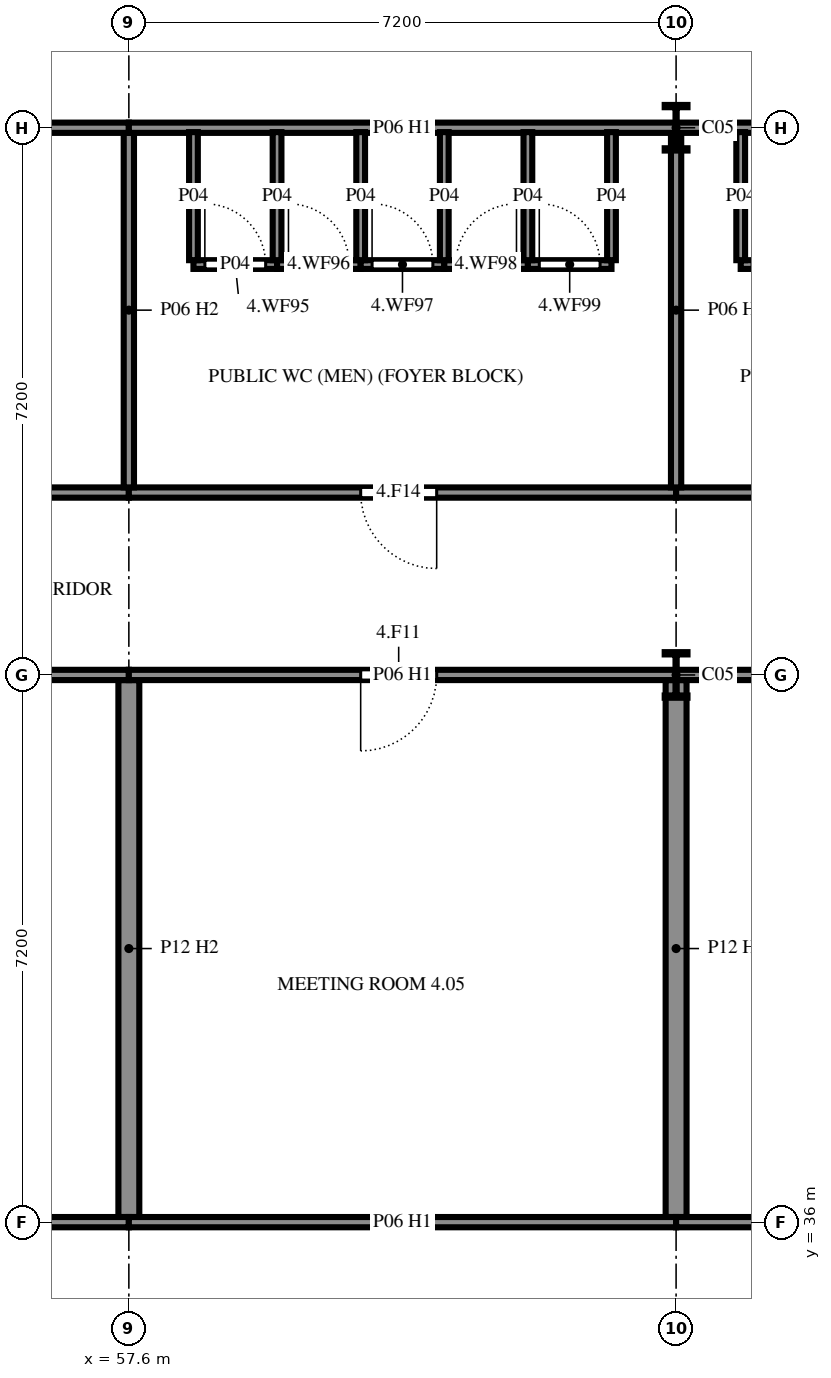
"""IFC4 building model, lengths in metres.
Left out: names, types, materials, properties, quantities, classifications, styles, units other than length and angle.
Written with IfcOpenShell. Run it as: python <this file> out.ifc"""

import sys

from ifc_helpers import new_model, si_unit, direction, frame, frame_2d, origin, origin_2d, place, context, subcontext, project, spatial, rectangle, i_section, extrude, element, fill, save


model = new_model("IFC4")
c1 = context("Model", 3, precision=1e-05, world=origin(), true_north=direction((0.0, 1.0)))
c2 = subcontext(c1, "Body", "Model", "MODEL_VIEW")
j1 = project(units=[si_unit("LENGTHUNIT", "METRE"), si_unit("PLANEANGLEUNIT", "RADIAN")], contexts=[c1])
p1 = place(None, origin())
s1 = spatial("IfcSite", under=j1, at=p1, CompositionType="ELEMENT")
p2 = place(p1, origin())
s2 = spatial("IfcBuilding", under=s1, at=p2, CompositionType="ELEMENT")
p3 = place(p2, frame((0.0, 0.0, 14.4)))
s3 = spatial("IfcBuildingStorey", under=s2, at=p3, CompositionType="ELEMENT", Elevation=14.4)
for number, where, z_axis, x_axis in (
    (1, (64.8, 43.2, 0.0), (0.0, 0.0, 1.0), (1.0, 0.0, 0.0)),
    (2, (64.8, 50.4, 0.0), (0.0, 0.0, 1.0), (1.0, 0.0, 0.0)),
):
    element("IfcColumn", number, at=place(p3, frame(where, z_axis=z_axis, x_axis=x_axis)), inside=s3, PredefinedType="COLUMN", context=c2, shape_type="SweptSolid", body=[
        extrude(i_section(OverallWidth=0.3, OverallDepth=0.6, WebThickness=0.015, FlangeThickness=0.03, FilletRadius=0.027, at=origin_2d()), origin(), (0.0, 0.0, 1.0), 3.6),
    ])
p4 = place(p3, frame((57.6, 43.133, 0.0), z_axis=(0.0, 0.0, 1.0), x_axis=(0.0, -1.0, 0.0)))
e3 = element("IfcWall", 3, at=p4, inside=s3, PredefinedType="PARTITIONING", context=c2, shape_type="SweptSolid", body=[
    extrude(rectangle(XDim=7.065, YDim=0.275, at=frame_2d((3.533, 0.0))), origin(), (0.0, 0.0, 1.0), 3.12),
])
p5 = place(p3, frame((50.333, 43.2, 0.0), z_axis=(0.0, 0.0, 1.0), x_axis=(1.0, 0.0, 0.0)))
e4 = element("IfcWall", 4, at=p5, inside=s3, PredefinedType="PARTITIONING", context=c2, shape_type="SweptSolid", body=[
    extrude(rectangle(XDim=7.268, YDim=0.135, at=frame_2d((3.634, 0.0))), origin(), (0.0, 0.0, 1.0), 2.82),
])
p6 = place(p5, frame((3.15, 0.0, 0.0)))
e5 = element("IfcOpeningElement", 5, at=p6, cuts=e4, PredefinedType="OPENING", context=c2, shape_type="SweptSolid", body=[
    extrude(rectangle(XDim=1.0, YDim=2.4, at=frame_2d((0.5, 1.2))), frame((0.0, 0.077, 0.0), z_axis=(0.0, -1.0, 0.0), x_axis=(1.0, 0.0, 0.0)), (0.0, 0.0, 1.0), 0.155),
])
p7 = place(p3, frame((57.6, 36.0, 0.0), z_axis=(0.0, 0.0, 1.0), x_axis=(-1.0, 0.0, 0.0)))
e6 = element("IfcWall", 6, at=p7, inside=s3, PredefinedType="PARTITIONING", context=c2, shape_type="SweptSolid", body=[
    extrude(rectangle(XDim=7.268, YDim=0.135, at=frame_2d((3.634, 0.0))), origin(), (0.0, 0.0, 1.0), 2.82),
])
p8 = place(p3, frame((64.8, 43.133, 0.0), z_axis=(0.0, 0.0, 1.0), x_axis=(0.0, -1.0, 0.0)))
e7 = element("IfcWall", 7, at=p8, inside=s3, PredefinedType="PARTITIONING", context=c2, shape_type="SweptSolid", body=[
    extrude(rectangle(XDim=7.065, YDim=0.275, at=frame_2d((3.533, 0.0))), origin(), (0.0, 0.0, 1.0), 2.82),
])
p9 = place(p3, frame((57.6, 43.2, 0.0), z_axis=(0.0, 0.0, 1.0), x_axis=(1.0, 0.0, 0.0)))
e8 = element("IfcWall", 8, at=p9, inside=s3, PredefinedType="PARTITIONING", context=c2, shape_type="SweptSolid", body=[
    extrude(rectangle(XDim=7.2, YDim=0.135, at=frame_2d((3.6, 0.0))), origin(), (0.0, 0.0, 1.0), 2.82),
])
p10 = place(p9, frame((3.05, 0.0, 0.0)))
e9 = element("IfcOpeningElement", 9, at=p10, cuts=e8, PredefinedType="OPENING", context=c2, shape_type="SweptSolid", body=[
    extrude(rectangle(XDim=1.0, YDim=2.4, at=frame_2d((0.5, 1.2))), frame((0.0, 0.077, 0.0), z_axis=(0.0, -1.0, 0.0), x_axis=(1.0, 0.0, 0.0)), (0.0, 0.0, 1.0), 0.155),
])
p11 = place(p3, frame((64.8, 36.0, 0.0), z_axis=(0.0, 0.0, 1.0), x_axis=(-1.0, 0.0, 0.0)))
e10 = element("IfcWall", 10, at=p11, inside=s3, PredefinedType="PARTITIONING", context=c2, shape_type="SweptSolid", body=[
    extrude(rectangle(XDim=7.2, YDim=0.135, at=frame_2d((3.6, 0.0))), origin(), (0.0, 0.0, 1.0), 2.82),
])
p12 = place(p3, frame((64.8, 43.2, 0.0), z_axis=(0.0, 0.0, 1.0), x_axis=(1.0, 0.0, 0.0)))
e11 = element("IfcWall", 11, at=p12, inside=s3, PredefinedType="PARTITIONING", context=c2, shape_type="SweptSolid", body=[
    extrude(rectangle(XDim=7.267, YDim=0.135, at=frame_2d((3.634, 0.0))), origin(), (0.0, 0.0, 1.0), 2.82),
])
p13 = place(p12, frame((3.15, 0.0, 0.0)))
e12 = element("IfcOpeningElement", 12, at=p13, cuts=e11, PredefinedType="OPENING", context=c2, shape_type="SweptSolid", body=[
    extrude(rectangle(XDim=1.0, YDim=2.4, at=frame_2d((0.5, 1.2))), frame((0.0, 0.077, 0.0), z_axis=(0.0, -1.0, 0.0), x_axis=(1.0, 0.0, 0.0)), (0.0, 0.0, 1.0), 0.155),
])
p14 = place(p3, frame((72.067, 36.0, 0.0), z_axis=(0.0, 0.0, 1.0), x_axis=(-1.0, 0.0, 0.0)))
e13 = element("IfcWall", 13, at=p14, inside=s3, PredefinedType="PARTITIONING", context=c2, shape_type="SweptSolid", body=[
    extrude(rectangle(XDim=7.267, YDim=0.135, at=frame_2d((3.634, 0.0))), origin(), (0.0, 0.0, 1.0), 2.82),
])
p15 = place(p3, frame((50.333, 45.6, 0.0), z_axis=(0.0, 0.0, 1.0), x_axis=(1.0, 0.0, 0.0)))
e14 = element("IfcWall", 14, at=p15, inside=s3, PredefinedType="PARTITIONING", context=c2, shape_type="SweptSolid", body=[
    extrude(rectangle(XDim=7.268, YDim=0.135, at=frame_2d((3.634, 0.0))), origin(), (0.0, 0.0, 1.0), 3.42),
])
p16 = place(p15, frame((3.15, 0.0, 0.0)))
e15 = element("IfcOpeningElement", 15, at=p16, cuts=e14, PredefinedType="OPENING", context=c2, shape_type="SweptSolid", body=[
    extrude(rectangle(XDim=1.0, YDim=2.4, at=frame_2d((0.5, 1.2))), frame((0.0, 0.077, 0.0), z_axis=(0.0, -1.0, 0.0), x_axis=(1.0, 0.0, 0.0)), (0.0, 0.0, 1.0), 0.155),
])
p17 = place(p3, frame((57.6, 45.6, 0.0), z_axis=(0.0, 0.0, 1.0), x_axis=(1.0, 0.0, 0.0)))
e16 = element("IfcWall", 16, at=p17, inside=s3, PredefinedType="PARTITIONING", context=c2, shape_type="SweptSolid", body=[
    extrude(rectangle(XDim=7.2, YDim=0.135, at=frame_2d((3.6, 0.0))), origin(), (0.0, 0.0, 1.0), 3.42),
])
p18 = place(p17, frame((3.05, 0.0, 0.0)))
e17 = element("IfcOpeningElement", 17, at=p18, cuts=e16, PredefinedType="OPENING", context=c2, shape_type="SweptSolid", body=[
    extrude(rectangle(XDim=1.0, YDim=2.4, at=frame_2d((0.5, 1.2))), frame((0.0, 0.077, 0.0), z_axis=(0.0, -1.0, 0.0), x_axis=(1.0, 0.0, 0.0)), (0.0, 0.0, 1.0), 0.155),
])
p19 = place(p3, frame((64.8, 45.6, 0.0), z_axis=(0.0, 0.0, 1.0), x_axis=(1.0, 0.0, 0.0)))
e18 = element("IfcWall", 18, at=p19, inside=s3, PredefinedType="PARTITIONING", context=c2, shape_type="SweptSolid", body=[
    extrude(rectangle(XDim=7.267, YDim=0.135, at=frame_2d((3.634, 0.0))), origin(), (0.0, 0.0, 1.0), 3.42),
])
p20 = place(p19, frame((3.15, 0.0, 0.0)))
e19 = element("IfcOpeningElement", 19, at=p20, cuts=e18, PredefinedType="OPENING", context=c2, shape_type="SweptSolid", body=[
    extrude(rectangle(XDim=1.0, YDim=2.4, at=frame_2d((0.5, 1.2))), frame((0.0, 0.077, 0.0), z_axis=(0.0, -1.0, 0.0), x_axis=(1.0, 0.0, 0.0)), (0.0, 0.0, 1.0), 0.155),
])
p21 = place(p3, frame((57.6, 50.333, 0.0), z_axis=(0.0, 0.0, 1.0), x_axis=(0.0, -1.0, 0.0)))
e20 = element("IfcWall", 20, at=p21, inside=s3, PredefinedType="PARTITIONING", context=c2, shape_type="SweptSolid", body=[
    extrude(rectangle(XDim=4.665, YDim=0.135, at=frame_2d((2.333, 0.0))), origin(), (0.0, 0.0, 1.0), 3.12),
])
p22 = place(p3, frame((50.333, 50.4, 0.0), z_axis=(0.0, 0.0, 1.0), x_axis=(1.0, 0.0, 0.0)))
e21 = element("IfcWall", 21, at=p22, inside=s3, PredefinedType="PARTITIONING", context=c2, shape_type="SweptSolid", body=[
    extrude(rectangle(XDim=7.268, YDim=0.135, at=frame_2d((3.634, 0.0))), origin(), (0.0, 0.0, 1.0), 2.82),
])
p23 = place(p3, frame((64.8, 50.333, 0.0), z_axis=(0.0, 0.0, 1.0), x_axis=(0.0, -1.0, 0.0)))
e22 = element("IfcWall", 22, at=p23, inside=s3, PredefinedType="PARTITIONING", context=c2, shape_type="SweptSolid", body=[
    extrude(rectangle(XDim=4.665, YDim=0.135, at=frame_2d((2.333, 0.0))), origin(), (0.0, 0.0, 1.0), 3.12),
])
p24 = place(p3, frame((57.6, 50.4, 0.0), z_axis=(0.0, 0.0, 1.0), x_axis=(1.0, 0.0, 0.0)))
e23 = element("IfcWall", 23, at=p24, inside=s3, PredefinedType="PARTITIONING", context=c2, shape_type="SweptSolid", body=[
    extrude(rectangle(XDim=7.2, YDim=0.135, at=frame_2d((3.6, 0.0))), origin(), (0.0, 0.0, 1.0), 2.82),
])
p25 = place(p3, frame((64.8, 50.4, 0.0), z_axis=(0.0, 0.0, 1.0), x_axis=(1.0, 0.0, 0.0)))
e24 = element("IfcWall", 24, at=p25, inside=s3, PredefinedType="PARTITIONING", context=c2, shape_type="SweptSolid", body=[
    extrude(rectangle(XDim=3.415, YDim=0.135, at=frame_2d((1.708, 0.0))), origin(), (0.0, 0.0, 1.0), 3.219),
])
p26 = place(p3, frame((58.45, 48.6, 0.0), z_axis=(0.0, 0.0, 1.0), x_axis=(1.0, 0.0, 0.0)))
e25 = element("IfcWall", 25, at=p26, inside=s3, PredefinedType="PARTITIONING", context=c2, shape_type="SweptSolid", body=[
    extrude(rectangle(XDim=1.1, YDim=0.115, at=frame_2d((0.55, 0.0))), origin(), (0.0, 0.0, 1.0), 3.42),
])
p27 = place(p26, frame((0.15, 0.0, 0.0)))
e26 = element("IfcOpeningElement", 26, at=p27, cuts=e25, PredefinedType="OPENING", context=c2, shape_type="SweptSolid", body=[
    extrude(rectangle(XDim=0.8, YDim=2.1, at=frame_2d((0.4, 1.05))), frame((0.0, 0.067, 0.0), z_axis=(0.0, -1.0, 0.0), x_axis=(1.0, 0.0, 0.0)), (0.0, 0.0, 1.0), 0.135),
])
p28 = place(p3, frame((58.45, 50.343, 0.0), z_axis=(0.0, 0.0, 1.0), x_axis=(0.0, -1.0, 0.0)))
e27 = element("IfcWall", 27, at=p28, inside=s3, PredefinedType="PARTITIONING", context=c2, shape_type="SweptSolid", body=[
    extrude(rectangle(XDim=1.685, YDim=0.115, at=frame_2d((0.843, 0.0))), origin(), (0.0, 0.0, 1.0), 3.42),
])
p29 = place(p3, frame((59.55, 48.6, 0.0), z_axis=(0.0, 0.0, 1.0), x_axis=(1.0, 0.0, 0.0)))
e28 = element("IfcWall", 28, at=p29, inside=s3, PredefinedType="PARTITIONING", context=c2, shape_type="SweptSolid", body=[
    extrude(rectangle(XDim=1.1, YDim=0.115, at=frame_2d((0.55, 0.0))), origin(), (0.0, 0.0, 1.0), 3.42),
])
p30 = place(p29, frame((0.15, 0.0, 0.0)))
e29 = element("IfcOpeningElement", 29, at=p30, cuts=e28, PredefinedType="OPENING", context=c2, shape_type="SweptSolid", body=[
    extrude(rectangle(XDim=0.8, YDim=2.1, at=frame_2d((0.4, 1.05))), frame((0.0, 0.067, 0.0), z_axis=(0.0, -1.0, 0.0), x_axis=(1.0, 0.0, 0.0)), (0.0, 0.0, 1.0), 0.135),
])
p31 = place(p3, frame((59.55, 50.343, 0.0), z_axis=(0.0, 0.0, 1.0), x_axis=(0.0, -1.0, 0.0)))
e30 = element("IfcWall", 30, at=p31, inside=s3, PredefinedType="PARTITIONING", context=c2, shape_type="SweptSolid", body=[
    extrude(rectangle(XDim=1.685, YDim=0.115, at=frame_2d((0.843, 0.0))), origin(), (0.0, 0.0, 1.0), 3.42),
])
p32 = place(p3, frame((60.65, 48.6, 0.0), z_axis=(0.0, 0.0, 1.0), x_axis=(1.0, 0.0, 0.0)))
e31 = element("IfcWall", 31, at=p32, inside=s3, PredefinedType="PARTITIONING", context=c2, shape_type="SweptSolid", body=[
    extrude(rectangle(XDim=1.1, YDim=0.115, at=frame_2d((0.55, 0.0))), origin(), (0.0, 0.0, 1.0), 3.42),
])
p33 = place(p32, frame((0.15, 0.0, 0.0)))
e32 = element("IfcOpeningElement", 32, at=p33, cuts=e31, PredefinedType="OPENING", context=c2, shape_type="SweptSolid", body=[
    extrude(rectangle(XDim=0.8, YDim=2.1, at=frame_2d((0.4, 1.05))), frame((0.0, 0.067, 0.0), z_axis=(0.0, -1.0, 0.0), x_axis=(1.0, 0.0, 0.0)), (0.0, 0.0, 1.0), 0.135),
])
p34 = place(p3, frame((60.65, 50.343, 0.0), z_axis=(0.0, 0.0, 1.0), x_axis=(0.0, -1.0, 0.0)))
e33 = element("IfcWall", 33, at=p34, inside=s3, PredefinedType="PARTITIONING", context=c2, shape_type="SweptSolid", body=[
    extrude(rectangle(XDim=1.685, YDim=0.115, at=frame_2d((0.843, 0.0))), origin(), (0.0, 0.0, 1.0), 3.42),
])
p35 = place(p3, frame((61.75, 48.6, 0.0), z_axis=(0.0, 0.0, 1.0), x_axis=(1.0, 0.0, 0.0)))
e34 = element("IfcWall", 34, at=p35, inside=s3, PredefinedType="PARTITIONING", context=c2, shape_type="SweptSolid", body=[
    extrude(rectangle(XDim=1.1, YDim=0.115, at=frame_2d((0.55, 0.0))), origin(), (0.0, 0.0, 1.0), 3.42),
])
p36 = place(p35, frame((0.15, 0.0, 0.0)))
e35 = element("IfcOpeningElement", 35, at=p36, cuts=e34, PredefinedType="OPENING", context=c2, shape_type="SweptSolid", body=[
    extrude(rectangle(XDim=0.8, YDim=2.1, at=frame_2d((0.4, 1.05))), frame((0.0, 0.067, 0.0), z_axis=(0.0, -1.0, 0.0), x_axis=(1.0, 0.0, 0.0)), (0.0, 0.0, 1.0), 0.135),
])
p37 = place(p3, frame((61.75, 50.343, 0.0), z_axis=(0.0, 0.0, 1.0), x_axis=(0.0, -1.0, 0.0)))
e36 = element("IfcWall", 36, at=p37, inside=s3, PredefinedType="PARTITIONING", context=c2, shape_type="SweptSolid", body=[
    extrude(rectangle(XDim=1.685, YDim=0.115, at=frame_2d((0.843, 0.0))), origin(), (0.0, 0.0, 1.0), 3.42),
])
p38 = place(p3, frame((62.85, 48.6, 0.0), z_axis=(0.0, 0.0, 1.0), x_axis=(1.0, 0.0, 0.0)))
e37 = element("IfcWall", 37, at=p38, inside=s3, PredefinedType="PARTITIONING", context=c2, shape_type="SweptSolid", body=[
    extrude(rectangle(XDim=1.1, YDim=0.115, at=frame_2d((0.55, 0.0))), origin(), (0.0, 0.0, 1.0), 3.42),
])
p39 = place(p38, frame((0.15, 0.0, 0.0)))
e38 = element("IfcOpeningElement", 38, at=p39, cuts=e37, PredefinedType="OPENING", context=c2, shape_type="SweptSolid", body=[
    extrude(rectangle(XDim=0.8, YDim=2.1, at=frame_2d((0.4, 1.05))), frame((0.0, 0.067, 0.0), z_axis=(0.0, -1.0, 0.0), x_axis=(1.0, 0.0, 0.0)), (0.0, 0.0, 1.0), 0.135),
])
for number, where, z_axis, x_axis in (
    (39, (62.85, 50.343, 0.0), (0.0, 0.0, 1.0), (0.0, -1.0, 0.0)),
    (40, (63.95, 50.343, 0.0), (0.0, 0.0, 1.0), (0.0, -1.0, 0.0)),
):
    element("IfcWall", number, at=place(p3, frame(where, z_axis=z_axis, x_axis=x_axis)), inside=s3, PredefinedType="PARTITIONING", context=c2, shape_type="SweptSolid", body=[
        extrude(rectangle(XDim=1.685, YDim=0.115, at=frame_2d((0.843, 0.0))), origin(), (0.0, 0.0, 1.0), 3.42),
    ])
p40 = place(p3, frame((65.65, 48.6, 0.0), z_axis=(0.0, 0.0, 1.0), x_axis=(1.0, 0.0, 0.0)))
e41 = element("IfcWall", 41, at=p40, inside=s3, PredefinedType="PARTITIONING", context=c2, shape_type="SweptSolid", body=[
    extrude(rectangle(XDim=1.1, YDim=0.115, at=frame_2d((0.55, 0.0))), origin(), (0.0, 0.0, 1.0), 3.42),
])
p41 = place(p40, frame((0.15, 0.0, 0.0)))
e42 = element("IfcOpeningElement", 42, at=p41, cuts=e41, PredefinedType="OPENING", context=c2, shape_type="SweptSolid", body=[
    extrude(rectangle(XDim=0.8, YDim=2.1, at=frame_2d((0.4, 1.05))), frame((0.0, 0.067, 0.0), z_axis=(0.0, -1.0, 0.0), x_axis=(1.0, 0.0, 0.0)), (0.0, 0.0, 1.0), 0.135),
])
p42 = place(p3, frame((65.65, 50.343, 0.0), z_axis=(0.0, 0.0, 1.0), x_axis=(0.0, -1.0, 0.0)))
e43 = element("IfcWall", 43, at=p42, inside=s3, PredefinedType="PARTITIONING", context=c2, shape_type="SweptSolid", body=[
    extrude(rectangle(XDim=1.685, YDim=0.115, at=frame_2d((0.843, 0.0))), origin(), (0.0, 0.0, 1.0), 3.42),
])
p43 = place(p10, frame((1.0, 0.0, 0.0), z_axis=(0.0, 0.0, 1.0), x_axis=(-1.0, 0.0, 0.0)))
e44 = element("IfcDoor", 44, at=p43, inside=s3, OperationType="SINGLE_SWING_LEFT", PredefinedType="DOOR", context=c2, shape_type="SweptSolid", body=[
    extrude(rectangle(XDim=1.0, YDim=2.4, at=frame_2d((0.5, 1.2))), frame((0.0, 0.025, 0.0), z_axis=(0.0, -1.0, 0.0), x_axis=(1.0, 0.0, 0.0)), (0.0, 0.0, 1.0), 0.05),
])
fill(e9, e44)
p44 = place(p18, frame((1.0, 0.0, 0.0), z_axis=(0.0, 0.0, 1.0), x_axis=(-1.0, 0.0, 0.0)))
e45 = element("IfcDoor", 45, at=p44, inside=s3, OperationType="SINGLE_SWING_RIGHT", PredefinedType="DOOR", context=c2, shape_type="SweptSolid", body=[
    extrude(rectangle(XDim=1.0, YDim=2.4, at=frame_2d((0.5, 1.2))), frame((0.0, 0.025, 0.0), z_axis=(0.0, -1.0, 0.0), x_axis=(1.0, 0.0, 0.0)), (0.0, 0.0, 1.0), 0.05),
])
fill(e17, e45)
p45 = place(p27, origin())
e46 = element("IfcDoor", 46, at=p45, inside=s3, OperationType="SINGLE_SWING_RIGHT", PredefinedType="DOOR", context=c2, shape_type="SweptSolid", body=[
    extrude(rectangle(XDim=0.8, YDim=2.1, at=frame_2d((0.4, 1.05))), frame((0.0, 0.025, 0.0), z_axis=(0.0, -1.0, 0.0), x_axis=(1.0, 0.0, 0.0)), (0.0, 0.0, 1.0), 0.05),
])
fill(e26, e46)
p46 = place(p30, origin())
e47 = element("IfcDoor", 47, at=p46, inside=s3, OperationType="SINGLE_SWING_RIGHT", PredefinedType="DOOR", context=c2, shape_type="SweptSolid", body=[
    extrude(rectangle(XDim=0.8, YDim=2.1, at=frame_2d((0.4, 1.05))), frame((0.0, 0.025, 0.0), z_axis=(0.0, -1.0, 0.0), x_axis=(1.0, 0.0, 0.0)), (0.0, 0.0, 1.0), 0.05),
])
fill(e29, e47)
p47 = place(p33, origin())
e48 = element("IfcDoor", 48, at=p47, inside=s3, OperationType="SINGLE_SWING_RIGHT", PredefinedType="DOOR", context=c2, shape_type="SweptSolid", body=[
    extrude(rectangle(XDim=0.8, YDim=2.1, at=frame_2d((0.4, 1.05))), frame((0.0, 0.025, 0.0), z_axis=(0.0, -1.0, 0.0), x_axis=(1.0, 0.0, 0.0)), (0.0, 0.0, 1.0), 0.05),
])
fill(e32, e48)
p48 = place(p36, origin())
e49 = element("IfcDoor", 49, at=p48, inside=s3, OperationType="SINGLE_SWING_LEFT", PredefinedType="DOOR", context=c2, shape_type="SweptSolid", body=[
    extrude(rectangle(XDim=0.8, YDim=2.1, at=frame_2d((0.4, 1.05))), frame((0.0, 0.025, 0.0), z_axis=(0.0, -1.0, 0.0), x_axis=(1.0, 0.0, 0.0)), (0.0, 0.0, 1.0), 0.05),
])
fill(e35, e49)
p49 = place(p39, origin())
e50 = element("IfcDoor", 50, at=p49, inside=s3, OperationType="SINGLE_SWING_RIGHT", PredefinedType="DOOR", context=c2, shape_type="SweptSolid", body=[
    extrude(rectangle(XDim=0.8, YDim=2.1, at=frame_2d((0.4, 1.05))), frame((0.0, 0.025, 0.0), z_axis=(0.0, -1.0, 0.0), x_axis=(1.0, 0.0, 0.0)), (0.0, 0.0, 1.0), 0.05),
])
fill(e38, e50)
p50 = place(p41, origin())
e51 = element("IfcDoor", 51, at=p50, inside=s3, OperationType="SINGLE_SWING_RIGHT", PredefinedType="DOOR", context=c2, shape_type="SweptSolid", body=[
    extrude(rectangle(XDim=0.8, YDim=2.1, at=frame_2d((0.4, 1.05))), frame((0.0, 0.025, 0.0), z_axis=(0.0, -1.0, 0.0), x_axis=(1.0, 0.0, 0.0)), (0.0, 0.0, 1.0), 0.05),
])
fill(e42, e51)
save(model, sys.argv[1])
